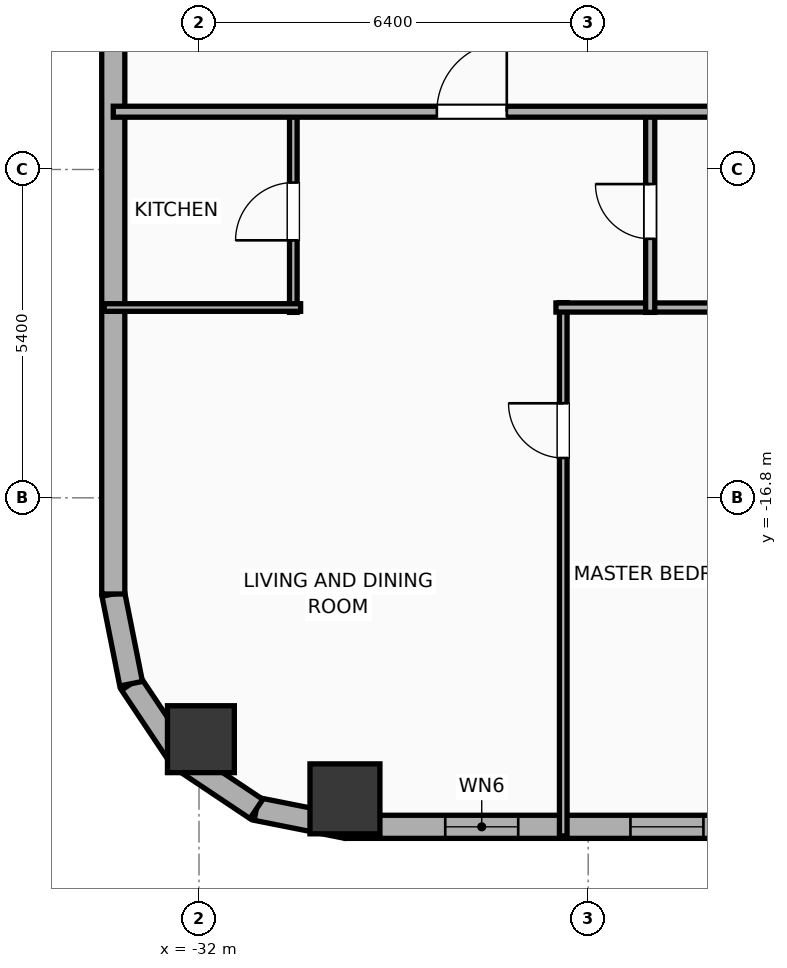
"""IFC4 building model, lengths in metres.
Left out: names, types, materials, properties, quantities, classifications, styles, units other than length and angle.
Written with IfcOpenShell. Run it as: python <this file> out.ifc"""

import sys

from ifc_helpers import new_model, si_unit, direction, frame, frame_2d, origin, origin_2d, place, context, subcontext, project, spatial, rectangle, hollow_rectangle, hollow_circle, extrude, element, fill, save


model = new_model("IFC4")
c1 = context("Model", 3, precision=1e-05, world=origin(), true_north=direction((0.0, 1.0)))
c2 = subcontext(c1, "Body", "Model", "MODEL_VIEW")
j1 = project(units=[si_unit("LENGTHUNIT", "METRE"), si_unit("PLANEANGLEUNIT", "RADIAN")], contexts=[c1])
p1 = place(None, origin())
s1 = spatial("IfcSite", under=j1, at=p1, CompositionType="ELEMENT")
p2 = place(p1, origin())
s2 = spatial("IfcBuilding", under=s1, at=p2, CompositionType="ELEMENT")
p3 = place(p2, frame((0.0, 0.0, 57.2)))
s3 = spatial("IfcBuildingStorey", under=s2, at=p3, CompositionType="ELEMENT", Elevation=57.2)
p4 = place(p3, frame((-29.6, -21.75, 0.0), z_axis=(0.0, 0.0, 1.0), x_axis=(1.0, 0.0, 0.0)))
e1 = element("IfcColumn", 1, at=p4, inside=s3, PredefinedType="COLUMN", context=c2, shape_type="SweptSolid", body=[
    extrude(hollow_rectangle(XDim=1.15, YDim=1.15, WallThickness=0.04, at=origin_2d()), origin(), (0.0, 0.0, 1.0), 3.9),
])
p5 = place(p3, frame((-31.969, -20.769, 0.0), z_axis=(0.0, 0.0, 1.0), x_axis=(1.0, 0.0, 0.0)))
e2 = element("IfcColumn", 2, at=p5, inside=s3, PredefinedType="COLUMN", context=c2, shape_type="SweptSolid", body=[
    extrude(hollow_circle(Radius=0.55, WallThickness=0.036, at=origin_2d()), origin(), (0.0, 0.0, 1.0), 3.9),
])
p6 = place(p3, frame((22.381, -22.21, 0.0), z_axis=(0.0, 0.0, 1.0), x_axis=(-1.0, 0.0, 0.0)))
e3 = element("IfcWall", 3, at=p6, inside=s3, PredefinedType="ELEMENTEDWALL", context=c2, shape_type="SweptSolid", body=[
    extrude(rectangle(XDim=51.963, YDim=0.38, at=frame_2d((25.981, 0.0))), origin(), (0.0, 0.0, 1.0), 3.65),
])
p7 = place(p6, frame((6.61, 0.0, 0.75)))
e4 = element("IfcOpeningElement", 4, at=p7, cuts=e3, PredefinedType="OPENING", context=c2, shape_type="SweptSolid", body=[
    extrude(rectangle(XDim=2.4, YDim=2.1, at=frame_2d((1.2, 1.05))), frame((0.0, 0.2, 0.0), z_axis=(0.0, -1.0, 0.0), x_axis=(1.0, 0.0, 0.0)), (0.0, 0.0, 1.0), 0.4),
])
p8 = place(p6, frame((25.631, 0.0, 0.75)))
e5 = element("IfcOpeningElement", 5, at=p8, cuts=e3, PredefinedType="OPENING", context=c2, shape_type="SweptSolid", body=[
    extrude(rectangle(XDim=2.4, YDim=2.1, at=frame_2d((1.2, 1.05))), frame((0.0, 0.2, 0.0), z_axis=(0.0, -1.0, 0.0), x_axis=(1.0, 0.0, 0.0)), (0.0, 0.0, 1.0), 0.4),
])
p9 = place(p6, frame((49.132, 0.0, 0.75)))
e6 = element("IfcOpeningElement", 6, at=p9, cuts=e3, PredefinedType="OPENING", context=c2, shape_type="SweptSolid", body=[
    extrude(rectangle(XDim=1.2, YDim=2.05, at=frame_2d((0.6, 1.025))), frame((0.0, 0.2, 0.0), z_axis=(0.0, -1.0, 0.0), x_axis=(1.0, 0.0, 0.0)), (0.0, 0.0, 1.0), 0.4),
])
p10 = place(p6, frame((46.086, 0.0, 0.75)))
e7 = element("IfcOpeningElement", 7, at=p10, cuts=e3, PredefinedType="OPENING", context=c2, shape_type="SweptSolid", body=[
    extrude(rectangle(XDim=1.2, YDim=2.05, at=frame_2d((0.6, 1.025))), frame((0.0, 0.2, 0.0), z_axis=(0.0, -1.0, 0.0), x_axis=(1.0, 0.0, 0.0)), (0.0, 0.0, 1.0), 0.4),
])
p11 = place(p6, frame((42.426, 0.0, 0.75)))
e8 = element("IfcOpeningElement", 8, at=p11, cuts=e3, PredefinedType="OPENING", context=c2, shape_type="SweptSolid", body=[
    extrude(rectangle(XDim=1.2, YDim=2.05, at=frame_2d((0.6, 1.025))), frame((0.0, 0.2, 0.0), z_axis=(0.0, -1.0, 0.0), x_axis=(1.0, 0.0, 0.0)), (0.0, 0.0, 1.0), 0.4),
])
p12 = place(p6, frame((38.286, 0.0, 0.75)))
e9 = element("IfcOpeningElement", 9, at=p12, cuts=e3, PredefinedType="OPENING", context=c2, shape_type="SweptSolid", body=[
    extrude(rectangle(XDim=1.2, YDim=2.05, at=frame_2d((0.6, 1.025))), frame((0.0, 0.2, 0.0), z_axis=(0.0, -1.0, 0.0), x_axis=(1.0, 0.0, 0.0)), (0.0, 0.0, 1.0), 0.4),
])
p13 = place(p6, frame((35.219, 0.0, 0.75)))
e10 = element("IfcOpeningElement", 10, at=p13, cuts=e3, PredefinedType="OPENING", context=c2, shape_type="SweptSolid", body=[
    extrude(rectangle(XDim=1.2, YDim=2.05, at=frame_2d((0.6, 1.025))), frame((0.0, 0.2, 0.0), z_axis=(0.0, -1.0, 0.0), x_axis=(1.0, 0.0, 0.0)), (0.0, 0.0, 1.0), 0.4),
])
p14 = place(p6, frame((32.039, 0.0, 0.75)))
e11 = element("IfcOpeningElement", 11, at=p14, cuts=e3, PredefinedType="OPENING", context=c2, shape_type="SweptSolid", body=[
    extrude(rectangle(XDim=1.2, YDim=2.05, at=frame_2d((0.6, 1.025))), frame((0.0, 0.2, 0.0), z_axis=(0.0, -1.0, 0.0), x_axis=(1.0, 0.0, 0.0)), (0.0, 0.0, 1.0), 0.4),
])
p15 = place(p6, frame((22.686, 0.0, 0.75)))
e12 = element("IfcOpeningElement", 12, at=p15, cuts=e3, PredefinedType="OPENING", context=c2, shape_type="SweptSolid", body=[
    extrude(rectangle(XDim=1.2, YDim=2.05, at=frame_2d((0.6, 1.025))), frame((0.0, 0.2, 0.0), z_axis=(0.0, -1.0, 0.0), x_axis=(1.0, 0.0, 0.0)), (0.0, 0.0, 1.0), 0.4),
])
p16 = place(p6, frame((18.786, 0.0, 0.75)))
e13 = element("IfcOpeningElement", 13, at=p16, cuts=e3, PredefinedType="OPENING", context=c2, shape_type="SweptSolid", body=[
    extrude(rectangle(XDim=1.2, YDim=2.05, at=frame_2d((0.6, 1.025))), frame((0.0, 0.2, 0.0), z_axis=(0.0, -1.0, 0.0), x_axis=(1.0, 0.0, 0.0)), (0.0, 0.0, 1.0), 0.4),
])
p17 = place(p6, frame((14.886, 0.0, 0.75)))
e14 = element("IfcOpeningElement", 14, at=p17, cuts=e3, PredefinedType="OPENING", context=c2, shape_type="SweptSolid", body=[
    extrude(rectangle(XDim=1.2, YDim=2.05, at=frame_2d((0.6, 1.025))), frame((0.0, 0.2, 0.0), z_axis=(0.0, -1.0, 0.0), x_axis=(1.0, 0.0, 0.0)), (0.0, 0.0, 1.0), 0.4),
])
p18 = place(p6, frame((11.826, 0.0, 0.75)))
e15 = element("IfcOpeningElement", 15, at=p18, cuts=e3, PredefinedType="OPENING", context=c2, shape_type="SweptSolid", body=[
    extrude(rectangle(XDim=1.2, YDim=2.05, at=frame_2d((0.6, 1.025))), frame((0.0, 0.2, 0.0), z_axis=(0.0, -1.0, 0.0), x_axis=(1.0, 0.0, 0.0)), (0.0, 0.0, 1.0), 0.4),
])
p19 = place(p6, frame((2.836, 0.0, 0.75)))
e16 = element("IfcOpeningElement", 16, at=p19, cuts=e3, PredefinedType="OPENING", context=c2, shape_type="SweptSolid", body=[
    extrude(rectangle(XDim=1.2, YDim=2.05, at=frame_2d((0.6, 1.025))), frame((0.0, 0.2, 0.0), z_axis=(0.0, -1.0, 0.0), x_axis=(1.0, 0.0, 0.0)), (0.0, 0.0, 1.0), 0.4),
])
p20 = place(p3, frame((-29.581, -22.21, 0.0), z_axis=(0.0, 0.0, 1.0), x_axis=(-0.980786132421, 0.195086038585, 0.0)))
e17 = element("IfcWall", 17, at=p20, inside=s3, PredefinedType="ELEMENTEDWALL", context=c2, shape_type="SweptSolid", body=[
    extrude(rectangle(XDim=1.504, YDim=0.38, at=frame_2d((0.752, 0.0))), origin(), (0.0, 0.0, 1.0), 3.65),
])
p21 = place(p3, frame((-31.057, -21.917, 0.0), z_axis=(0.0, 0.0, 1.0), x_axis=(-0.831442848281, 0.555610286119, 0.0)))
e18 = element("IfcWall", 18, at=p21, inside=s3, PredefinedType="ELEMENTEDWALL", context=c2, shape_type="SweptSolid", body=[
    extrude(rectangle(XDim=1.485, YDim=0.38, at=frame_2d((0.743, 0.0))), origin(), (0.0, 0.0, 1.0), 3.65),
])
p22 = place(p3, frame((-32.292, -21.091, 0.0), z_axis=(0.0, 0.0, 1.0), x_axis=(-0.555572577804, 0.831468045563, 0.0)))
e19 = element("IfcWall", 19, at=p22, inside=s3, PredefinedType="ELEMENTEDWALL", context=c2, shape_type="SweptSolid", body=[
    extrude(rectangle(XDim=1.485, YDim=0.38, at=frame_2d((0.742, 0.0))), origin(), (0.0, 0.0, 1.0), 3.65),
])
p23 = place(p3, frame((-33.116, -19.857, 0.0), z_axis=(0.0, 0.0, 1.0), x_axis=(-0.195086038585, 0.980786132421, 0.0)))
e20 = element("IfcWall", 20, at=p23, inside=s3, PredefinedType="ELEMENTEDWALL", context=c2, shape_type="SweptSolid", body=[
    extrude(rectangle(XDim=1.504, YDim=0.38, at=frame_2d((0.752, 0.0))), origin(), (0.0, 0.0, 1.0), 3.65),
])
p24 = place(p3, frame((-33.41, -18.381, 0.0), z_axis=(0.0, 0.0, 1.0), x_axis=(0.0, 1.0, 0.0)))
e21 = element("IfcWall", 21, at=p24, inside=s3, PredefinedType="ELEMENTEDWALL", context=c2, shape_type="SweptSolid", body=[
    extrude(rectangle(XDim=36.763, YDim=0.38, at=frame_2d((18.381, 0.0))), origin(), (0.0, 0.0, 1.0), 3.65),
])
p25 = place(p24, frame((33.362, 0.0, 0.75)))
e22 = element("IfcOpeningElement", 22, at=p25, cuts=e21, PredefinedType="OPENING", context=c2, shape_type="SweptSolid", body=[
    extrude(rectangle(XDim=1.2, YDim=2.05, at=frame_2d((0.6, 1.025))), frame((0.0, 0.2, 0.0), z_axis=(0.0, -1.0, 0.0), x_axis=(1.0, 0.0, 0.0)), (0.0, 0.0, 1.0), 0.4),
])
p26 = place(p24, frame((22.301, 0.0, 0.75)))
e23 = element("IfcOpeningElement", 23, at=p26, cuts=e21, PredefinedType="OPENING", context=c2, shape_type="SweptSolid", body=[
    extrude(rectangle(XDim=1.2, YDim=2.05, at=frame_2d((0.6, 1.025))), frame((0.0, 0.2, 0.0), z_axis=(0.0, -1.0, 0.0), x_axis=(1.0, 0.0, 0.0)), (0.0, 0.0, 1.0), 0.4),
])
p27 = place(p24, frame((13.401, 0.0, 0.75)))
e24 = element("IfcOpeningElement", 24, at=p27, cuts=e21, PredefinedType="OPENING", context=c2, shape_type="SweptSolid", body=[
    extrude(rectangle(XDim=1.2, YDim=2.05, at=frame_2d((0.6, 1.025))), frame((0.0, 0.2, 0.0), z_axis=(0.0, -1.0, 0.0), x_axis=(1.0, 0.0, 0.0)), (0.0, 0.0, 1.0), 0.4),
])
p28 = place(p3, frame((-26.01, -22.36, 0.0), z_axis=(0.0, 0.0, 1.0), x_axis=(0.0, 1.0, 0.0)))
e25 = element("IfcWall", 25, at=p28, inside=s3, PredefinedType="PARTITIONING", context=c2, shape_type="SweptSolid", body=[
    extrude(rectangle(XDim=8.77, YDim=0.125, at=frame_2d((4.385, 0.0))), origin(), (0.0, 0.0, 1.0), 3.65),
])
p29 = place(p28, frame((6.215, 0.0, 0.0)))
e26 = element("IfcOpeningElement", 26, at=p29, cuts=e25, PredefinedType="OPENING", context=c2, shape_type="SweptSolid", body=[
    extrude(rectangle(XDim=0.9, YDim=2.05, at=frame_2d((0.45, 1.025))), frame((0.0, 0.073, 0.0), z_axis=(0.0, -1.0, 0.0), x_axis=(1.0, 0.0, 0.0)), (0.0, 0.0, 1.0), 0.145),
])
p30 = place(p3, frame((-26.13, -13.67, 0.0), z_axis=(0.0, 0.0, 1.0), x_axis=(1.0, 0.0, 0.0)))
e27 = element("IfcWall", 27, at=p30, inside=s3, PredefinedType="PLUMBINGWALL", context=c2, shape_type="SweptSolid", body=[
    extrude(rectangle(XDim=3.605, YDim=0.15, at=frame_2d((1.802, 0.0))), origin(), (0.0, 0.0, 1.0), 3.65),
])
p31 = place(p3, frame((-30.449, -13.75, 0.0), z_axis=(0.0, 0.0, 1.0), x_axis=(0.0, 1.0, 0.0)))
e28 = element("IfcWall", 28, at=p31, inside=s3, PredefinedType="PARTITIONING", context=c2, shape_type="SweptSolid", body=[
    extrude(rectangle(XDim=3.32, YDim=0.125, at=frame_2d((1.66, 0.0))), origin(), (0.0, 0.0, 1.0), 3.65),
])
p32 = place(p31, frame((1.185, 0.0, 0.0)))
e29 = element("IfcOpeningElement", 29, at=p32, cuts=e28, PredefinedType="OPENING", context=c2, shape_type="SweptSolid", body=[
    extrude(rectangle(XDim=0.95, YDim=2.05, at=frame_2d((0.475, 1.025))), frame((0.0, 0.073, 0.0), z_axis=(0.0, -1.0, 0.0), x_axis=(1.0, 0.0, 0.0)), (0.0, 0.0, 1.0), 0.145),
])
p33 = place(p3, frame((-33.56, -13.67, 0.0), z_axis=(0.0, 0.0, 1.0), x_axis=(1.0, 0.0, 0.0)))
e30 = element("IfcWall", 30, at=p33, inside=s3, PredefinedType="PARTITIONING", context=c2, shape_type="SweptSolid", body=[
    extrude(rectangle(XDim=3.231, YDim=0.125, at=frame_2d((1.615, 0.0))), origin(), (0.0, 0.0, 1.0), 3.65),
])
p34 = place(p3, frame((-24.58, -13.75, 0.0), z_axis=(0.0, 0.0, 1.0), x_axis=(0.0, 1.0, 0.0)))
e31 = element("IfcWall", 31, at=p34, inside=s3, PredefinedType="PLUMBINGWALL", context=c2, shape_type="SweptSolid", body=[
    extrude(rectangle(XDim=3.32, YDim=0.15, at=frame_2d((1.66, 0.0))), origin(), (0.0, 0.0, 1.0), 3.65),
])
p35 = place(p34, frame((1.21, 0.0, 0.0)))
e32 = element("IfcOpeningElement", 32, at=p35, cuts=e31, PredefinedType="OPENING", context=c2, shape_type="SweptSolid", body=[
    extrude(rectangle(XDim=0.9, YDim=2.05, at=frame_2d((0.45, 1.025))), frame((0.0, 0.085, 0.0), z_axis=(0.0, -1.0, 0.0), x_axis=(1.0, 0.0, 0.0)), (0.0, 0.0, 1.0), 0.17),
])
p36 = place(p3, frame((-33.41, -10.45, 0.0), z_axis=(0.0, 0.0, 1.0), x_axis=(1.0, 0.0, 0.0)))
e33 = element("IfcWall", 33, at=p36, inside=s3, PredefinedType="PARTITIONING", context=c2, shape_type="SweptSolid", body=[
    extrude(rectangle(XDim=59.62, YDim=0.18, at=frame_2d((29.81, 0.0))), origin(), (0.0, 0.0, 1.0), 3.65),
])
p37 = place(p36, frame((5.321, 0.0, 0.0)))
e34 = element("IfcOpeningElement", 34, at=p37, cuts=e33, PredefinedType="OPENING", context=c2, shape_type="SweptSolid", body=[
    extrude(rectangle(XDim=1.15, YDim=2.05, at=frame_2d((0.575, 1.025))), frame((0.0, 0.1, 0.0), z_axis=(0.0, -1.0, 0.0), x_axis=(1.0, 0.0, 0.0)), (0.0, 0.0, 1.0), 0.2),
])
p38 = place(p36, frame((14.3, 0.0, 0.0)))
e35 = element("IfcOpeningElement", 35, at=p38, cuts=e33, PredefinedType="OPENING", context=c2, shape_type="SweptSolid", body=[
    extrude(rectangle(XDim=1.15, YDim=2.05, at=frame_2d((0.575, 1.025))), frame((0.0, 0.1, 0.0), z_axis=(0.0, -1.0, 0.0), x_axis=(1.0, 0.0, 0.0)), (0.0, 0.0, 1.0), 0.2),
])
p39 = place(p36, frame((22.265, 0.0, 0.0)))
e36 = element("IfcOpeningElement", 36, at=p39, cuts=e33, PredefinedType="OPENING", context=c2, shape_type="SweptSolid", body=[
    extrude(rectangle(XDim=0.9, YDim=2.05, at=frame_2d((0.45, 1.025))), frame((0.0, 0.1, 0.0), z_axis=(0.0, -1.0, 0.0), x_axis=(1.0, 0.0, 0.0)), (0.0, 0.0, 1.0), 0.2),
])
p40 = place(p36, frame((29.903, 0.0, 0.0)))
e37 = element("IfcOpeningElement", 37, at=p40, cuts=e33, PredefinedType="OPENING", context=c2, shape_type="SweptSolid", body=[
    extrude(rectangle(XDim=1.15, YDim=2.05, at=frame_2d((0.575, 1.025))), frame((0.0, 0.1, 0.0), z_axis=(0.0, -1.0, 0.0), x_axis=(1.0, 0.0, 0.0)), (0.0, 0.0, 1.0), 0.2),
])
p41 = place(p36, frame((37.701, 0.0, 0.0)))
e38 = element("IfcOpeningElement", 38, at=p41, cuts=e33, PredefinedType="OPENING", context=c2, shape_type="SweptSolid", body=[
    extrude(rectangle(XDim=1.15, YDim=2.05, at=frame_2d((0.575, 1.025))), frame((0.0, 0.1, 0.0), z_axis=(0.0, -1.0, 0.0), x_axis=(1.0, 0.0, 0.0)), (0.0, 0.0, 1.0), 0.2),
])
p42 = place(p36, frame((45.654, 0.0, 0.0)))
e39 = element("IfcOpeningElement", 39, at=p42, cuts=e33, PredefinedType="OPENING", context=c2, shape_type="SweptSolid", body=[
    extrude(rectangle(XDim=0.9, YDim=2.05, at=frame_2d((0.45, 1.025))), frame((0.0, 0.1, 0.0), z_axis=(0.0, -1.0, 0.0), x_axis=(1.0, 0.0, 0.0)), (0.0, 0.0, 1.0), 0.2),
])
p43 = place(p36, frame((54.472, 0.0, 0.0)))
e40 = element("IfcOpeningElement", 40, at=p43, cuts=e33, PredefinedType="OPENING", context=c2, shape_type="SweptSolid", body=[
    extrude(rectangle(XDim=1.15, YDim=2.05, at=frame_2d((0.575, 1.025))), frame((0.0, 0.1, 0.0), z_axis=(0.0, -1.0, 0.0), x_axis=(1.0, 0.0, 0.0)), (0.0, 0.0, 1.0), 0.2),
])
p44 = place(p9, origin())
e41 = element("IfcWindow", 41, at=p44, inside=s3, PartitioningType="SINGLE_PANEL", PredefinedType="WINDOW", context=c2, shape_type="SweptSolid", body=[
    extrude(rectangle(XDim=1.2, YDim=2.05, at=frame_2d((0.6, 1.025))), frame((0.0, 0.03, 0.0), z_axis=(0.0, -1.0, 0.0), x_axis=(1.0, 0.0, 0.0)), (0.0, 0.0, 1.0), 0.06),
])
fill(e6, e41)
p45 = place(p10, origin())
e42 = element("IfcWindow", 42, at=p45, inside=s3, PartitioningType="SINGLE_PANEL", PredefinedType="WINDOW", context=c2, shape_type="SweptSolid", body=[
    extrude(rectangle(XDim=1.2, YDim=2.05, at=frame_2d((0.6, 1.025))), frame((0.0, 0.03, 0.0), z_axis=(0.0, -1.0, 0.0), x_axis=(1.0, 0.0, 0.0)), (0.0, 0.0, 1.0), 0.06),
])
fill(e7, e42)
p46 = place(p29, origin())
e43 = element("IfcDoor", 43, at=p46, inside=s3, OperationType="SINGLE_SWING_RIGHT", PredefinedType="DOOR", context=c2, shape_type="SweptSolid", body=[
    extrude(rectangle(XDim=0.9, YDim=2.05, at=frame_2d((0.45, 1.025))), frame((0.0, 0.025, 0.0), z_axis=(0.0, -1.0, 0.0), x_axis=(1.0, 0.0, 0.0)), (0.0, 0.0, 1.0), 0.05),
])
fill(e26, e43)
p47 = place(p32, origin())
e44 = element("IfcDoor", 44, at=p47, inside=s3, OperationType="SINGLE_SWING_LEFT", PredefinedType="DOOR", context=c2, shape_type="SweptSolid", body=[
    extrude(rectangle(XDim=0.95, YDim=2.05, at=frame_2d((0.475, 1.025))), frame((0.0, 0.025, 0.0), z_axis=(0.0, -1.0, 0.0), x_axis=(1.0, 0.0, 0.0)), (0.0, 0.0, 1.0), 0.05),
])
fill(e29, e44)
p48 = place(p35, origin())
e45 = element("IfcDoor", 45, at=p48, inside=s3, OperationType="SINGLE_SWING_RIGHT", PredefinedType="DOOR", context=c2, shape_type="SweptSolid", body=[
    extrude(rectangle(XDim=0.9, YDim=2.05, at=frame_2d((0.45, 1.025))), frame((0.0, 0.025, 0.0), z_axis=(0.0, -1.0, 0.0), x_axis=(1.0, 0.0, 0.0)), (0.0, 0.0, 1.0), 0.05),
])
fill(e32, e45)
p49 = place(p37, origin())
e46 = element("IfcDoor", 46, at=p49, inside=s3, OperationType="SINGLE_SWING_RIGHT", PredefinedType="DOOR", context=c2, shape_type="SweptSolid", body=[
    extrude(rectangle(XDim=1.15, YDim=2.05, at=frame_2d((0.575, 1.025))), frame((0.0, 0.025, 0.0), z_axis=(0.0, -1.0, 0.0), x_axis=(1.0, 0.0, 0.0)), (0.0, 0.0, 1.0), 0.05),
])
fill(e34, e46)
save(model, sys.argv[1])
